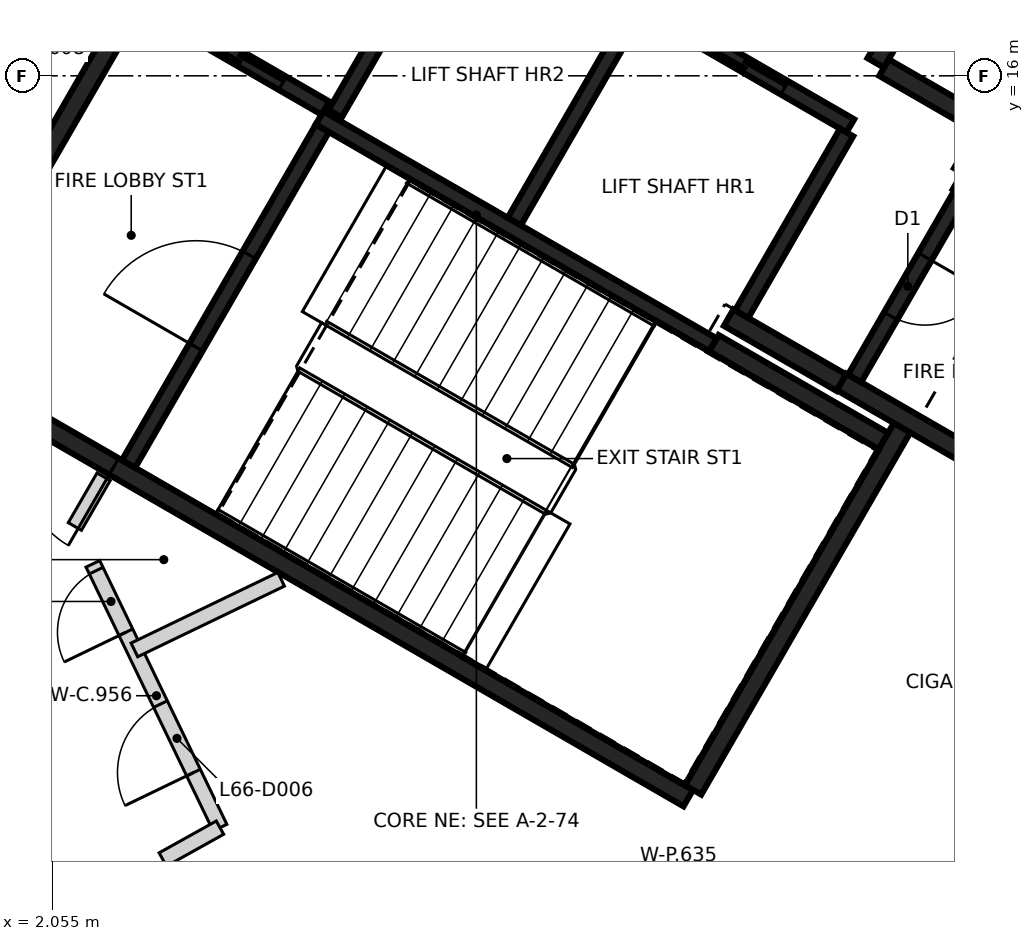
"""IFC4 building model, lengths in metres.
Left out: names, types, materials, properties, quantities, classifications, styles, units other than length and angle.
Written with IfcOpenShell. Run it as: python <this file> out.ifc"""

import sys

from ifc_helpers import new_model, si_unit, direction, frame, frame_2d, origin, place, context, subcontext, project, spatial, rectangle, extrude, element, fill, save


model = new_model("IFC4")
c1 = context("Model", 3, precision=1e-05, world=origin(), true_north=direction((0.0, 1.0)))
c2 = subcontext(c1, "Body", "Model", "MODEL_VIEW")
j1 = project(units=[si_unit("LENGTHUNIT", "METRE"), si_unit("PLANEANGLEUNIT", "RADIAN")], contexts=[c1])
p1 = place(None, origin())
s1 = spatial("IfcSite", under=j1, at=p1, CompositionType="ELEMENT")
p2 = place(p1, origin())
s2 = spatial("IfcBuilding", under=s1, at=p2, CompositionType="ELEMENT")
p3 = place(p2, frame((0.0, 0.0, 262.2)))
s3 = spatial("IfcBuildingStorey", under=s2, at=p3, CompositionType="ELEMENT", Elevation=262.2)
p4 = place(p3, frame((10.42, 6.498, 0.0), z_axis=(0.0, 0.0, 1.0), x_axis=(-0.866021906294, 0.500006057782, 0.0)))
e1 = element("IfcWall", 1, at=p4, inside=s3, PredefinedType="SHEAR", context=c2, shape_type="SweptSolid", body=[
    extrude(rectangle(XDim=11.55, YDim=0.25, at=frame_2d((5.775, 0.0))), origin(), (0.0, 0.0, 1.0), 3.25),
])
p5 = place(p4, frame((10.025, 0.0, 0.0)))
e2 = element("IfcOpeningElement", 2, at=p5, cuts=e1, PredefinedType="OPENING", context=c2, shape_type="SweptSolid", body=[
    extrude(rectangle(XDim=1.2, YDim=2.1, at=frame_2d((0.6, 1.05))), frame((0.0, 0.135, 0.0), z_axis=(0.0, -1.0, 0.0), x_axis=(1.0, 0.0, 0.0)), (0.0, 0.0, 1.0), 0.27),
])
p6 = place(p4, frame((8.725, 0.0, 0.0)))
e3 = element("IfcOpeningElement", 3, at=p6, cuts=e1, PredefinedType="OPENING", context=c2, shape_type="SweptSolid", body=[
    extrude(rectangle(XDim=1.2, YDim=2.1, at=frame_2d((0.6, 1.05))), frame((0.0, 0.135, 0.0), z_axis=(0.0, -1.0, 0.0), x_axis=(1.0, 0.0, 0.0)), (0.0, 0.0, 1.0), 0.27),
])
p7 = place(p3, frame((0.48, 12.381, 0.0), z_axis=(0.0, 0.0, 1.0), x_axis=(0.49999885962, 0.866026062182, 0.0)))
e4 = element("IfcWall", 4, at=p7, inside=s3, PredefinedType="SHEAR", context=c2, shape_type="SweptSolid", body=[
    extrude(rectangle(XDim=5.225, YDim=0.25, at=frame_2d((2.612, 0.0))), origin(), (0.0, 0.0, 1.0), 3.25),
])
p8 = place(p3, frame((13.238, 11.378, 0.0), z_axis=(0.0, 0.0, 1.0), x_axis=(-0.500008851346, -0.866020293397, 0.0)))
e5 = element("IfcWall", 5, at=p8, inside=s3, PredefinedType="SHEAR", context=c2, shape_type="SweptSolid", body=[
    extrude(rectangle(XDim=5.51, YDim=0.25, at=frame_2d((2.755, 0.0))), origin(), (0.0, 0.0, 1.0), 3.25),
])
p9 = place(p3, frame((14.918, 10.54, 0.0), z_axis=(0.0, 0.0, 1.0), x_axis=(-0.866063538972, 0.499933942099, 0.0)))
e6 = element("IfcWall", 6, at=p9, inside=s3, PredefinedType="SHEAR", context=c2, shape_type="SweptSolid", body=[
    extrude(rectangle(XDim=2.865, YDim=0.25, at=frame_2d((1.432, 0.0))), origin(), (0.0, 0.0, 1.0), 3.25),
])
p10 = place(p3, frame((13.963, 14.614, 0.0), z_axis=(0.0, 0.0, 1.0), x_axis=(0.866042235819, -0.499970844928, 0.0)))
e7 = element("IfcWall", 7, at=p10, inside=s3, PredefinedType="SHEAR", context=c2, shape_type="SweptSolid", body=[
    extrude(rectangle(XDim=2.865, YDim=0.25, at=frame_2d((1.432, 0.0))), origin(), (0.0, 0.0, 1.0), 3.25),
])
p11 = place(p3, frame((10.757, 12.481, 0.0), z_axis=(0.0, 0.0, 1.0), x_axis=(0.866022940537, -0.500004266446, 0.0)))
e8 = element("IfcWall", 8, at=p11, inside=s3, PredefinedType="SHEAR", context=c2, shape_type="SweptSolid", body=[
    extrude(rectangle(XDim=2.575, YDim=0.25, at=frame_2d((1.287, 0.0))), origin(), (0.0, 0.0, 1.0), 3.25),
])
p12 = place(p3, frame((13.819, 17.785, 0.0), z_axis=(0.0, 0.0, 1.0), x_axis=(-0.500039802285, -0.866002422705, 0.0)))
e9 = element("IfcWall", 9, at=p12, inside=s3, PredefinedType="SHEAR", context=c2, shape_type="SweptSolid", body=[
    extrude(rectangle(XDim=1.865, YDim=0.25, at=frame_2d((0.932, 0.0))), origin(), (0.0, 0.0, 1.0), 3.25),
])
p13 = place(p3, frame((12.433, 11.964, 0.0), z_axis=(0.0, 0.0, 1.0), x_axis=(-0.866038183914, 0.499977863513, 0.0)))
e10 = element("IfcWall", 10, at=p13, inside=s3, PredefinedType="SHEAR", context=c2, shape_type="SweptSolid", body=[
    extrude(rectangle(XDim=1.71, YDim=0.25, at=frame_2d((0.855, 0.0))), origin(), (0.0, 0.0, 1.0), 3.25),
])
p14 = place(p3, frame((12.995, 16.108, 0.0), z_axis=(0.0, 0.0, 1.0), x_axis=(0.866044474677, -0.49996696679, 0.0)))
e11 = element("IfcWall", 11, at=p14, inside=s3, PredefinedType="SHEAR", context=c2, shape_type="SweptSolid", body=[
    extrude(rectangle(XDim=1.584, YDim=0.25, at=frame_2d((0.792, 0.0))), origin(), (0.0, 0.0, 1.0), 3.25),
])
p15 = place(p3, frame((14.305, 15.207, 0.0), z_axis=(0.0, 0.0, 1.0), x_axis=(-0.499848422343, -0.866112899501, 0.0)))
e12 = element("IfcWall", 12, at=p15, inside=s3, PredefinedType="SHEAR", context=c2, shape_type="SweptSolid", body=[
    extrude(rectangle(XDim=0.559, YDim=0.25, at=frame_2d((0.28, 0.0))), origin(), (0.0, 0.0, 1.0), 3.25),
])
p16 = place(p3, frame((12.552, 15.342, 0.0), z_axis=(0.0, 0.0, 1.0), x_axis=(-0.866030299012, 0.499991521122, 0.0)))
e13 = element("IfcWall", 13, at=p16, inside=s3, PredefinedType="SHEAR", context=c2, shape_type="SweptSolid", body=[
    extrude(rectangle(XDim=6.1, YDim=0.2, at=frame_2d((3.05, 0.0))), origin(), (0.0, 0.0, 1.0), 3.25),
])
p17 = place(p16, frame((1.0, 0.0, 0.0)))
e14 = element("IfcOpeningElement", 14, at=p17, cuts=e13, PredefinedType="OPENING", context=c2, shape_type="SweptSolid", body=[
    extrude(rectangle(XDim=1.2, YDim=2.1, at=frame_2d((0.6, 1.05))), frame((0.0, 0.11, 0.0), z_axis=(0.0, -1.0, 0.0), x_axis=(1.0, 0.0, 0.0)), (0.0, 0.0, 1.0), 0.22),
])
p18 = place(p16, frame((3.982, 0.0, 0.0)))
e15 = element("IfcOpeningElement", 15, at=p18, cuts=e13, PredefinedType="OPENING", context=c2, shape_type="SweptSolid", body=[
    extrude(rectangle(XDim=1.2, YDim=2.1, at=frame_2d((0.6, 1.05))), frame((0.0, 0.11, 0.0), z_axis=(0.0, -1.0, 0.0), x_axis=(1.0, 0.0, 0.0)), (0.0, 0.0, 1.0), 0.22),
])
p19 = place(p3, frame((10.743, 12.46, 0.0), z_axis=(0.0, 0.0, 1.0), x_axis=(-0.866018848283, 0.500011354289, 0.0)))
e16 = element("IfcWall", 16, at=p19, inside=s3, PredefinedType="SHEAR", context=c2, shape_type="SweptSolid", body=[
    extrude(rectangle(XDim=5.974, YDim=0.2, at=frame_2d((2.987, 0.0))), origin(), (0.0, 0.0, 1.0), 3.25),
])
p20 = place(p3, frame((3.057, 10.895, 0.0), z_axis=(0.0, 0.0, 1.0), x_axis=(0.500027839223, 0.866009330205, 0.0)))
e17 = element("IfcWall", 17, at=p20, inside=s3, PredefinedType="SHEAR", context=c2, shape_type="SweptSolid", body=[
    extrude(rectangle(XDim=5.098, YDim=0.2, at=frame_2d((2.549, 0.0))), origin(), (0.0, 0.0, 1.0), 3.25),
])
p21 = place(p20, frame((1.774, 0.0, 0.0)))
e18 = element("IfcOpeningElement", 18, at=p21, cuts=e17, PredefinedType="OPENING", context=c2, shape_type="SweptSolid", body=[
    extrude(rectangle(XDim=1.4, YDim=2.1, at=frame_2d((0.7, 1.05))), frame((0.0, 0.11, 0.0), z_axis=(0.0, -1.0, 0.0), x_axis=(1.0, 0.0, 0.0)), (0.0, 0.0, 1.0), 0.22),
])
p22 = place(p3, frame((8.132, 14.084, 0.0), z_axis=(0.0, 0.0, 1.0), x_axis=(0.500030834389, 0.86600760081, 0.0)))
e19 = element("IfcWall", 19, at=p22, inside=s3, PredefinedType="SHEAR", context=c2, shape_type="SweptSolid", body=[
    extrude(rectangle(XDim=3.198, YDim=0.2, at=frame_2d((1.599, 0.0))), origin(), (0.0, 0.0, 1.0), 3.25),
])
p23 = place(p3, frame((14.008, 14.442, 0.0), z_axis=(0.0, 0.0, 1.0), x_axis=(-0.499986818241, -0.866033014143, 0.0)))
e20 = element("IfcWall", 20, at=p23, inside=s3, PredefinedType="SHEAR", context=c2, shape_type="SweptSolid", body=[
    extrude(rectangle(XDim=2.798, YDim=0.2, at=frame_2d((1.399, 0.0))), origin(), (0.0, 0.0, 1.0), 3.25),
])
p24 = place(p23, frame((0.949, 0.0, 0.0)))
e21 = element("IfcOpeningElement", 21, at=p24, cuts=e20, PredefinedType="OPENING", context=c2, shape_type="SweptSolid", body=[
    extrude(rectangle(XDim=0.9, YDim=2.1, at=frame_2d((0.45, 1.05))), frame((0.0, 0.11, 0.0), z_axis=(0.0, -1.0, 0.0), x_axis=(1.0, 0.0, 0.0)), (0.0, 0.0, 1.0), 0.22),
])
p25 = place(p3, frame((12.502, 15.255, 0.0), z_axis=(0.0, 0.0, 1.0), x_axis=(-0.499965018551, -0.866045599391, 0.0)))
e22 = element("IfcWall", 22, at=p25, inside=s3, PredefinedType="SHEAR", context=c2, shape_type="SweptSolid", body=[
    extrude(rectangle(XDim=2.759, YDim=0.2, at=frame_2d((1.379, 0.0))), origin(), (0.0, 0.0, 1.0), 3.25),
])
p26 = place(p3, frame((7.324, 18.187, 0.0), z_axis=(0.0, 0.0, 1.0), x_axis=(-0.499967891604, -0.866043940782, 0.0)))
e23 = element("IfcWall", 23, at=p26, inside=s3, PredefinedType="SHEAR", context=c2, shape_type="SweptSolid", body=[
    extrude(rectangle(XDim=3.1, YDim=0.2, at=frame_2d((1.55, 0.0))), origin(), (0.0, 0.0, 1.0), 3.25),
])
p27 = place(p3, frame((5.646, 15.576, 0.0), z_axis=(0.0, 0.0, 1.0), x_axis=(-0.866018407898, 0.500012117035, 0.0)))
e24 = element("IfcWall", 24, at=p27, inside=s3, PredefinedType="SHEAR", context=c2, shape_type="SweptSolid", body=[
    extrude(rectangle(XDim=2.651, YDim=0.2, at=frame_2d((1.325, 0.0))), origin(), (0.0, 0.0, 1.0), 3.25),
])
p28 = place(p27, frame((0.652, 0.0, 0.0)))
e25 = element("IfcOpeningElement", 25, at=p28, cuts=e24, PredefinedType="OPENING", context=c2, shape_type="SweptSolid", body=[
    extrude(rectangle(XDim=1.3, YDim=2.1, at=frame_2d((0.65, 1.05))), frame((0.0, 0.11, 0.0), z_axis=(0.0, -1.0, 0.0), x_axis=(1.0, 0.0, 0.0)), (0.0, 0.0, 1.0), 0.22),
])
p29 = place(p3, frame((-1.027, 12.757, 0.0), z_axis=(0.0, 0.0, 1.0), x_axis=(0.492663063759, 0.870220147783, 0.0)))
e26 = element("IfcWall", 26, at=p29, inside=s3, PredefinedType="PARTITIONING", context=c2, shape_type="SweptSolid", body=[
    extrude(rectangle(XDim=6.187, YDim=0.2, at=frame_2d((3.094, 0.0))), origin(), (0.0, 0.0, 1.0), 3.25),
])
p30 = place(p29, frame((2.65, 0.0, 0.0)))
e27 = element("IfcOpeningElement", 27, at=p30, cuts=e26, PredefinedType="OPENING", context=c2, shape_type="SweptSolid", body=[
    extrude(rectangle(XDim=0.95, YDim=2.1, at=frame_2d((0.475, 1.05))), frame((0.0, 0.11, 0.0), z_axis=(0.0, -1.0, 0.0), x_axis=(1.0, 0.0, 0.0)), (0.0, 0.0, 1.0), 0.22),
])
p31 = place(p3, frame((2.35, 10.071, 0.0), z_axis=(0.0, 0.0, 1.0), x_axis=(0.500309905322, 0.865846405916, 0.0)))
e28 = element("IfcWall", 28, at=p31, inside=s3, PredefinedType="PARTITIONING", context=c2, shape_type="SweptSolid", body=[
    extrude(rectangle(XDim=0.755, YDim=0.2, at=frame_2d((0.378, 0.0))), origin(), (0.0, 0.0, 1.0), 3.25),
])
p32 = place(p3, frame((4.26, 6.109, 0.0), z_axis=(0.0, 0.0, 1.0), x_axis=(-0.434189007872, 0.900821794498, 0.0)))
e29 = element("IfcWall", 29, at=p32, inside=s3, PredefinedType="PARTITIONING", context=c2, shape_type="SweptSolid", body=[
    extrude(rectangle(XDim=3.853, YDim=0.2, at=frame_2d((1.926, 0.0))), origin(), (0.0, 0.0, 1.0), 3.25),
])
p33 = place(p32, frame((2.853, 0.0, 0.0)))
e30 = element("IfcOpeningElement", 30, at=p33, cuts=e29, PredefinedType="OPENING", context=c2, shape_type="SweptSolid", body=[
    extrude(rectangle(XDim=0.9, YDim=2.1, at=frame_2d((0.45, 1.05))), frame((0.0, 0.11, 0.0), z_axis=(0.0, -1.0, 0.0), x_axis=(1.0, 0.0, 0.0)), (0.0, 0.0, 1.0), 0.22),
])
p34 = place(p32, frame((0.804, 0.0, 0.0)))
e31 = element("IfcOpeningElement", 31, at=p34, cuts=e29, PredefinedType="OPENING", context=c2, shape_type="SweptSolid", body=[
    extrude(rectangle(XDim=1.0, YDim=2.1, at=frame_2d((0.5, 1.05))), frame((0.0, 0.11, 0.0), z_axis=(0.0, -1.0, 0.0), x_axis=(1.0, 0.0, 0.0)), (0.0, 0.0, 1.0), 0.22),
])
p35 = place(p3, frame((3.507, 5.69, 0.0), z_axis=(0.0, 0.0, 1.0), x_axis=(0.873567976284, 0.486702158215, 0.0)))
e32 = element("IfcWall", 32, at=p35, inside=s3, PredefinedType="PARTITIONING", context=c2, shape_type="SweptSolid", body=[
    extrude(rectangle(XDim=0.861, YDim=0.2, at=frame_2d((0.43, 0.0))), origin(), (0.0, 0.0, 1.0), 3.25),
])
p36 = place(p3, frame((3.133, 8.447, 0.0), z_axis=(0.0, 0.0, 1.0), x_axis=(0.900981876458, 0.433856725538, 0.0)))
e33 = element("IfcWall", 33, at=p36, inside=s3, PredefinedType="PARTITIONING", context=c2, shape_type="SweptSolid", body=[
    extrude(rectangle(XDim=2.143, YDim=0.2, at=frame_2d((1.071, 0.0))), origin(), (0.0, 0.0, 1.0), 3.25),
])
p37 = place(p28, origin())
e34 = element("IfcDoor", 34, at=p37, inside=s3, OperationType="SLIDING_TO_LEFT", PredefinedType="DOOR", context=c2, shape_type="SweptSolid", body=[
    extrude(rectangle(XDim=1.3, YDim=2.1, at=frame_2d((0.65, 1.05))), frame((0.0, 0.025, 0.0), z_axis=(0.0, -1.0, 0.0), x_axis=(1.0, 0.0, 0.0)), (0.0, 0.0, 1.0), 0.05),
])
fill(e25, e34)
p38 = place(p17, origin())
e35 = element("IfcDoor", 35, at=p38, inside=s3, OperationType="DOUBLE_DOOR_SLIDING", PredefinedType="DOOR", context=c2, shape_type="SweptSolid", body=[
    extrude(rectangle(XDim=1.2, YDim=2.1, at=frame_2d((0.6, 1.05))), frame((0.0, 0.025, 0.0), z_axis=(0.0, -1.0, 0.0), x_axis=(1.0, 0.0, 0.0)), (0.0, 0.0, 1.0), 0.05),
])
fill(e14, e35)
p39 = place(p6, origin())
e36 = element("IfcDoor", 36, at=p39, inside=s3, OperationType="SINGLE_SWING_RIGHT", PredefinedType="DOOR", context=c2, shape_type="SweptSolid", body=[
    extrude(rectangle(XDim=1.2, YDim=2.1, at=frame_2d((0.6, 1.05))), frame((0.0, 0.025, 0.0), z_axis=(0.0, -1.0, 0.0), x_axis=(1.0, 0.0, 0.0)), (0.0, 0.0, 1.0), 0.05),
])
fill(e3, e36)
p40 = place(p21, origin())
e37 = element("IfcDoor", 37, at=p40, inside=s3, OperationType="SINGLE_SWING_LEFT", PredefinedType="DOOR", context=c2, shape_type="SweptSolid", body=[
    extrude(rectangle(XDim=1.4, YDim=2.1, at=frame_2d((0.7, 1.05))), frame((0.0, 0.025, 0.0), z_axis=(0.0, -1.0, 0.0), x_axis=(1.0, 0.0, 0.0)), (0.0, 0.0, 1.0), 0.05),
])
fill(e18, e37)
p41 = place(p24, origin())
e38 = element("IfcDoor", 38, at=p41, inside=s3, OperationType="SINGLE_SWING_RIGHT", PredefinedType="DOOR", context=c2, shape_type="SweptSolid", body=[
    extrude(rectangle(XDim=0.9, YDim=2.1, at=frame_2d((0.45, 1.05))), frame((0.0, 0.025, 0.0), z_axis=(0.0, -1.0, 0.0), x_axis=(1.0, 0.0, 0.0)), (0.0, 0.0, 1.0), 0.05),
])
fill(e21, e38)
p42 = place(p33, origin())
e39 = element("IfcDoor", 39, at=p42, inside=s3, OperationType="SINGLE_SWING_LEFT", PredefinedType="DOOR", context=c2, shape_type="SweptSolid", body=[
    extrude(rectangle(XDim=0.9, YDim=2.1, at=frame_2d((0.45, 1.05))), frame((0.0, 0.025, 0.0), z_axis=(0.0, -1.0, 0.0), x_axis=(1.0, 0.0, 0.0)), (0.0, 0.0, 1.0), 0.05),
])
fill(e30, e39)
p43 = place(p34, origin())
e40 = element("IfcDoor", 40, at=p43, inside=s3, OperationType="SINGLE_SWING_LEFT", PredefinedType="DOOR", context=c2, shape_type="SweptSolid", body=[
    extrude(rectangle(XDim=1.0, YDim=2.1, at=frame_2d((0.5, 1.05))), frame((0.0, 0.025, 0.0), z_axis=(0.0, -1.0, 0.0), x_axis=(1.0, 0.0, 0.0)), (0.0, 0.0, 1.0), 0.05),
])
fill(e31, e40)
save(model, sys.argv[1])
